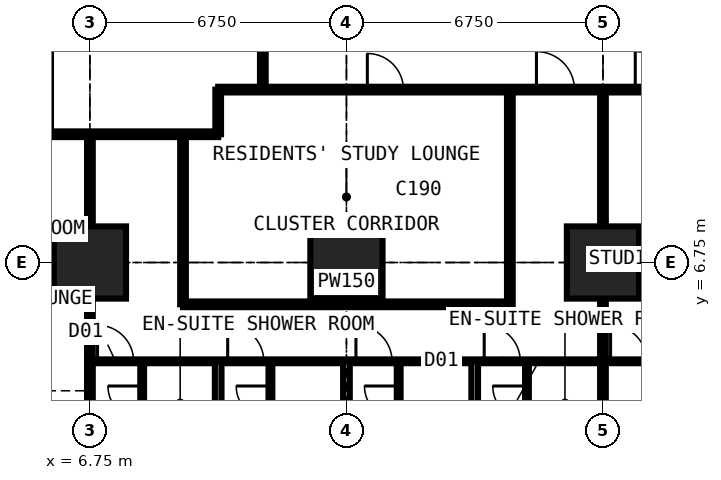
"""IFC4 building model, lengths in metres.
Left out: names, types, materials, properties, quantities, classifications, styles, units other than length and angle.
Written with IfcOpenShell. Run it as: python <this file> out.ifc"""

import sys

from ifc_helpers import new_model, si_unit, direction, frame, frame_2d, origin, origin_2d, place, context, subcontext, project, spatial, rectangle, extrude, element, fill, save


model = new_model("IFC4")
c1 = context("Model", 3, precision=1e-05, world=origin(), true_north=direction((0.0, 1.0)))
c2 = subcontext(c1, "Body", "Model", "MODEL_VIEW")
j1 = project(units=[si_unit("LENGTHUNIT", "METRE"), si_unit("PLANEANGLEUNIT", "RADIAN")], contexts=[c1])
p1 = place(None, origin())
s1 = spatial("IfcSite", under=j1, at=p1, CompositionType="ELEMENT")
p2 = place(p1, origin())
s2 = spatial("IfcBuilding", under=s1, at=p2, CompositionType="ELEMENT")
p3 = place(p2, frame((0.0, 0.0, 21.6)))
s3 = spatial("IfcBuildingStorey", under=s2, at=p3, CompositionType="ELEMENT", Elevation=21.6)
for number, where, z_axis, x_axis in (
    (1, (6.75, 6.75, 0.0), (0.0, 0.0, 1.0), (1.0, 0.0, 0.0)),
    (2, (13.5, 6.75, 0.0), (0.0, 0.0, 1.0), (1.0, 0.0, 0.0)),
    (3, (20.25, 6.75, 0.0), (0.0, 0.0, 1.0), (1.0, 0.0, 0.0)),
):
    element("IfcColumn", number, at=place(p3, frame(where, z_axis=z_axis, x_axis=x_axis)), inside=s3, PredefinedType="COLUMN", context=c2, shape_type="SweptSolid", body=[
        extrude(rectangle(XDim=1.9, YDim=1.9, at=origin_2d()), origin(), (0.0, 0.0, 1.0), 3.6),
    ])
p4 = place(p3, frame((-0.734, 10.125, 0.0), z_axis=(0.0, 0.0, 1.0), x_axis=(1.0, 0.0, 0.0)))
e4 = element("IfcWall", 4, at=p4, inside=s3, PredefinedType="PARTITIONING", context=c2, shape_type="SweptSolid", body=[
    extrude(rectangle(XDim=10.859, YDim=0.15, at=frame_2d((5.429, 0.0))), origin(), (0.0, 0.0, 1.0), 3.375),
])
p5 = place(p4, frame((5.134, 0.0, 0.0)))
e5 = element("IfcOpeningElement", 5, at=p5, cuts=e4, PredefinedType="OPENING", context=c2, shape_type="SweptSolid", body=[
    extrude(rectangle(XDim=1.0, YDim=2.2, at=frame_2d((0.5, 1.1))), frame((0.0, 0.085, 0.0), z_axis=(0.0, -1.0, 0.0), x_axis=(1.0, 0.0, 0.0)), (0.0, 0.0, 1.0), 0.17),
])
p6 = place(p3, frame((6.75, -0.734, 0.0), z_axis=(0.0, 0.0, 1.0), x_axis=(0.0, 1.0, 0.0)))
e6 = element("IfcWall", 6, at=p6, inside=s3, PredefinedType="PARTITIONING", context=c2, shape_type="SweptSolid", body=[
    extrude(rectangle(XDim=10.859, YDim=0.15, at=frame_2d((5.429, 0.0))), origin(), (0.0, 0.0, 1.0), 2.877),
])
p7 = place(p3, frame((6.75, 4.15, 0.0), z_axis=(0.0, 0.0, 1.0), x_axis=(1.0, 0.0, 0.0)))
e7 = element("IfcWall", 7, at=p7, inside=s3, PredefinedType="PARTITIONING", context=c2, shape_type="SweptSolid", body=[
    extrude(rectangle(XDim=23.625, YDim=0.1, at=frame_2d((11.812, 0.0))), origin(), (0.0, 0.0, 1.0), 3.375),
])
p8 = place(p7, frame((0.2, 0.0, 0.0)))
e8 = element("IfcOpeningElement", 8, at=p8, cuts=e7, PredefinedType="OPENING", context=c2, shape_type="SweptSolid", body=[
    extrude(rectangle(XDim=0.95, YDim=2.2, at=frame_2d((0.475, 1.1))), frame((0.0, 0.06, 0.0), z_axis=(0.0, -1.0, 0.0), x_axis=(1.0, 0.0, 0.0)), (0.0, 0.0, 1.0), 0.12),
])
p9 = place(p7, frame((3.625, 0.0, 0.0)))
e9 = element("IfcOpeningElement", 9, at=p9, cuts=e7, PredefinedType="OPENING", context=c2, shape_type="SweptSolid", body=[
    extrude(rectangle(XDim=0.95, YDim=2.2, at=frame_2d((0.475, 1.1))), frame((0.0, 0.06, 0.0), z_axis=(0.0, -1.0, 0.0), x_axis=(1.0, 0.0, 0.0)), (0.0, 0.0, 1.0), 0.12),
])
p10 = place(p7, frame((7.0, 0.0, 0.0)))
e10 = element("IfcOpeningElement", 10, at=p10, cuts=e7, PredefinedType="OPENING", context=c2, shape_type="SweptSolid", body=[
    extrude(rectangle(XDim=0.95, YDim=2.2, at=frame_2d((0.475, 1.1))), frame((0.0, 0.06, 0.0), z_axis=(0.0, -1.0, 0.0), x_axis=(1.0, 0.0, 0.0)), (0.0, 0.0, 1.0), 0.12),
])
p11 = place(p7, frame((10.375, 0.0, 0.0)))
e11 = element("IfcOpeningElement", 11, at=p11, cuts=e7, PredefinedType="OPENING", context=c2, shape_type="SweptSolid", body=[
    extrude(rectangle(XDim=0.95, YDim=2.2, at=frame_2d((0.475, 1.1))), frame((0.0, 0.06, 0.0), z_axis=(0.0, -1.0, 0.0), x_axis=(1.0, 0.0, 0.0)), (0.0, 0.0, 1.0), 0.12),
])
p12 = place(p7, frame((18.475, 0.0, 0.0)))
e12 = element("IfcOpeningElement", 12, at=p12, cuts=e7, PredefinedType="OPENING", context=c2, shape_type="SweptSolid", body=[
    extrude(rectangle(XDim=0.95, YDim=2.2, at=frame_2d((0.475, 1.1))), frame((0.0, 0.06, 0.0), z_axis=(0.0, -1.0, 0.0), x_axis=(1.0, 0.0, 0.0)), (0.0, 0.0, 1.0), 0.12),
])
p13 = place(p7, frame((13.7, 0.0, 0.0)))
e13 = element("IfcOpeningElement", 13, at=p13, cuts=e7, PredefinedType="OPENING", context=c2, shape_type="SweptSolid", body=[
    extrude(rectangle(XDim=0.95, YDim=2.2, at=frame_2d((0.475, 1.1))), frame((0.0, 0.06, 0.0), z_axis=(0.0, -1.0, 0.0), x_axis=(1.0, 0.0, 0.0)), (0.0, 0.0, 1.0), 0.12),
])
p14 = place(p3, frame((8.125, 1.95, 0.0), z_axis=(0.0, 0.0, 1.0), x_axis=(0.0, 1.0, 0.0)))
e14 = element("IfcWall", 14, at=p14, inside=s3, PredefinedType="PARTITIONING", context=c2, shape_type="SweptSolid", body=[
    extrude(rectangle(XDim=2.2, YDim=0.1, at=frame_2d((1.1, 0.0))), origin(), (0.0, 0.0, 1.0), 3.375),
])
p15 = place(p14, frame((0.65, 0.0, 0.0)))
e15 = element("IfcOpeningElement", 15, at=p15, cuts=e14, PredefinedType="OPENING", context=c2, shape_type="SweptSolid", body=[
    extrude(rectangle(XDim=0.9, YDim=2.2, at=frame_2d((0.45, 1.1))), frame((0.0, 0.06, 0.0), z_axis=(0.0, -1.0, 0.0), x_axis=(1.0, 0.0, 0.0)), (0.0, 0.0, 1.0), 0.12),
])
p16 = place(p3, frame((9.2, 5.65, 0.0), z_axis=(0.0, 0.0, 1.0), x_axis=(0.0, 1.0, 0.0)))
e16 = element("IfcWall", 16, at=p16, inside=s3, PredefinedType="PARTITIONING", context=c2, shape_type="SweptSolid", body=[
    extrude(rectangle(XDim=4.475, YDim=0.15, at=frame_2d((2.238, 0.0))), origin(), (0.0, 0.0, 1.0), 3.375),
])
p17 = place(p3, frame((9.2, 5.65, 0.0), z_axis=(0.0, 0.0, 1.0), x_axis=(1.0, 0.0, 0.0)))
e17 = element("IfcWall", 17, at=p17, inside=s3, PredefinedType="PARTITIONING", context=c2, shape_type="SweptSolid", body=[
    extrude(rectangle(XDim=8.6, YDim=0.15, at=frame_2d((4.3, 0.0))), origin(), (0.0, 0.0, 1.0), 3.375),
])
p18 = place(p3, frame((10.125, -0.734, 0.0), z_axis=(0.0, 0.0, 1.0), x_axis=(0.0, 1.0, 0.0)))
e18 = element("IfcWall", 18, at=p18, inside=s3, PredefinedType="PARTITIONING", context=c2, shape_type="SweptSolid", body=[
    extrude(rectangle(XDim=4.884, YDim=0.175, at=frame_2d((2.442, 0.0))), origin(), (0.0, 0.0, 1.0), 3.375),
])
p19 = place(p3, frame((10.125, 10.125, 0.0), z_axis=(0.0, 0.0, 1.0), x_axis=(0.0, 1.0, 0.0)))
e19 = element("IfcWall", 19, at=p19, inside=s3, PredefinedType="PARTITIONING", context=c2, shape_type="SweptSolid", body=[
    extrude(rectangle(XDim=1.175, YDim=0.15, at=frame_2d((0.587, 0.0))), origin(), (0.0, 0.0, 1.0), 3.375),
])
p20 = place(p3, frame((10.125, 11.3, 0.0), z_axis=(0.0, 0.0, 1.0), x_axis=(1.0, 0.0, 0.0)))
e20 = element("IfcWall", 20, at=p20, inside=s3, PredefinedType="PARTITIONING", context=c2, shape_type="SweptSolid", body=[
    extrude(rectangle(XDim=20.675, YDim=0.15, at=frame_2d((10.337, 0.0))), origin(), (0.0, 0.0, 1.0), 3.375),
])
p21 = place(p20, frame((8.375, 0.0, 0.0)))
e21 = element("IfcOpeningElement", 21, at=p21, cuts=e20, PredefinedType="OPENING", context=c2, shape_type="SweptSolid", body=[
    extrude(rectangle(XDim=1.0, YDim=2.2, at=frame_2d((0.5, 1.1))), frame((0.0, 0.085, 0.0), z_axis=(0.0, -1.0, 0.0), x_axis=(1.0, 0.0, 0.0)), (0.0, 0.0, 1.0), 0.17),
])
p22 = place(p20, frame((10.975, 0.0, 0.0)))
e22 = element("IfcOpeningElement", 22, at=p22, cuts=e20, PredefinedType="OPENING", context=c2, shape_type="SweptSolid", body=[
    extrude(rectangle(XDim=1.0, YDim=2.2, at=frame_2d((0.5, 1.1))), frame((0.0, 0.085, 0.0), z_axis=(0.0, -1.0, 0.0), x_axis=(1.0, 0.0, 0.0)), (0.0, 0.0, 1.0), 0.17),
])
p23 = place(p20, frame((3.925, 0.0, 0.0)))
e23 = element("IfcOpeningElement", 23, at=p23, cuts=e20, PredefinedType="OPENING", context=c2, shape_type="SweptSolid", body=[
    extrude(rectangle(XDim=0.95, YDim=2.2, at=frame_2d((0.475, 1.1))), frame((0.0, 0.085, 0.0), z_axis=(0.0, -1.0, 0.0), x_axis=(1.0, 0.0, 0.0)), (0.0, 0.0, 1.0), 0.17),
])
p24 = place(p3, frame((11.3, 11.3, 0.0), z_axis=(0.0, 0.0, 1.0), x_axis=(0.0, 1.0, 0.0)))
e24 = element("IfcWall", 24, at=p24, inside=s3, PredefinedType="PARTITIONING", context=c2, shape_type="SweptSolid", body=[
    extrude(rectangle(XDim=19.075, YDim=0.15, at=frame_2d((9.538, 0.0))), origin(), (0.0, 0.0, 1.0), 3.375),
])
p25 = place(p24, frame((12.875, 0.0, 0.0)))
e25 = element("IfcOpeningElement", 25, at=p25, cuts=e24, PredefinedType="OPENING", context=c2, shape_type="SweptSolid", body=[
    extrude(rectangle(XDim=1.0, YDim=2.2, at=frame_2d((0.5, 1.1))), frame((0.0, 0.085, 0.0), z_axis=(0.0, -1.0, 0.0), x_axis=(1.0, 0.0, 0.0)), (0.0, 0.0, 1.0), 0.17),
])
p26 = place(p24, frame((10.438, 0.0, 0.0)))
e26 = element("IfcOpeningElement", 26, at=p26, cuts=e24, PredefinedType="OPENING", context=c2, shape_type="SweptSolid", body=[
    extrude(rectangle(XDim=1.0, YDim=2.2, at=frame_2d((0.5, 1.1))), frame((0.0, 0.085, 0.0), z_axis=(0.0, -1.0, 0.0), x_axis=(1.0, 0.0, 0.0)), (0.0, 0.0, 1.0), 0.17),
])
p27 = place(p24, frame((15.675, 0.0, 0.0)))
e27 = element("IfcOpeningElement", 27, at=p27, cuts=e24, PredefinedType="OPENING", context=c2, shape_type="SweptSolid", body=[
    extrude(rectangle(XDim=0.95, YDim=2.2, at=frame_2d((0.475, 1.1))), frame((0.0, 0.085, 0.0), z_axis=(0.0, -1.0, 0.0), x_axis=(1.0, 0.0, 0.0)), (0.0, 0.0, 1.0), 0.17),
])
p28 = place(p3, frame((11.5, 1.95, 0.0), z_axis=(0.0, 0.0, 1.0), x_axis=(0.0, 1.0, 0.0)))
e28 = element("IfcWall", 28, at=p28, inside=s3, PredefinedType="PARTITIONING", context=c2, shape_type="SweptSolid", body=[
    extrude(rectangle(XDim=2.2, YDim=0.1, at=frame_2d((1.1, 0.0))), origin(), (0.0, 0.0, 1.0), 3.375),
])
p29 = place(p28, frame((0.65, 0.0, 0.0)))
e29 = element("IfcOpeningElement", 29, at=p29, cuts=e28, PredefinedType="OPENING", context=c2, shape_type="SweptSolid", body=[
    extrude(rectangle(XDim=0.9, YDim=2.2, at=frame_2d((0.45, 1.1))), frame((0.0, 0.06, 0.0), z_axis=(0.0, -1.0, 0.0), x_axis=(1.0, 0.0, 0.0)), (0.0, 0.0, 1.0), 0.12),
])
p30 = place(p3, frame((13.5, -0.734, 0.0), z_axis=(0.0, 0.0, 1.0), x_axis=(0.0, 1.0, 0.0)))
e30 = element("IfcWall", 30, at=p30, inside=s3, PredefinedType="PARTITIONING", context=c2, shape_type="SweptSolid", body=[
    extrude(rectangle(XDim=4.884, YDim=0.175, at=frame_2d((2.442, 0.0))), origin(), (0.0, 0.0, 1.0), 2.61),
])
p31 = place(p3, frame((14.875, 1.95, 0.0), z_axis=(0.0, 0.0, 1.0), x_axis=(0.0, 1.0, 0.0)))
e31 = element("IfcWall", 31, at=p31, inside=s3, PredefinedType="PARTITIONING", context=c2, shape_type="SweptSolid", body=[
    extrude(rectangle(XDim=2.2, YDim=0.1, at=frame_2d((1.1, 0.0))), origin(), (0.0, 0.0, 1.0), 3.375),
])
p32 = place(p31, frame((0.65, 0.0, 0.0)))
e32 = element("IfcOpeningElement", 32, at=p32, cuts=e31, PredefinedType="OPENING", context=c2, shape_type="SweptSolid", body=[
    extrude(rectangle(XDim=0.9, YDim=2.2, at=frame_2d((0.45, 1.1))), frame((0.0, 0.06, 0.0), z_axis=(0.0, -1.0, 0.0), x_axis=(1.0, 0.0, 0.0)), (0.0, 0.0, 1.0), 0.12),
])
p33 = place(p3, frame((16.875, -0.734, 0.0), z_axis=(0.0, 0.0, 1.0), x_axis=(0.0, 1.0, 0.0)))
e33 = element("IfcWall", 33, at=p33, inside=s3, PredefinedType="PARTITIONING", context=c2, shape_type="SweptSolid", body=[
    extrude(rectangle(XDim=4.884, YDim=0.175, at=frame_2d((2.442, 0.0))), origin(), (0.0, 0.0, 1.0), 3.375),
])
p34 = place(p3, frame((17.8, 5.65, 0.0), z_axis=(0.0, 0.0, 1.0), x_axis=(0.0, 1.0, 0.0)))
e34 = element("IfcWall", 34, at=p34, inside=s3, PredefinedType="PARTITIONING", context=c2, shape_type="SweptSolid", body=[
    extrude(rectangle(XDim=5.65, YDim=0.15, at=frame_2d((2.825, 0.0))), origin(), (0.0, 0.0, 1.0), 3.375),
])
p35 = place(p3, frame((18.25, 1.95, 0.0), z_axis=(0.0, 0.0, 1.0), x_axis=(0.0, 1.0, 0.0)))
e35 = element("IfcWall", 35, at=p35, inside=s3, PredefinedType="PARTITIONING", context=c2, shape_type="SweptSolid", body=[
    extrude(rectangle(XDim=2.2, YDim=0.1, at=frame_2d((1.1, 0.0))), origin(), (0.0, 0.0, 1.0), 3.375),
])
p36 = place(p35, frame((0.65, 0.0, 0.0)))
e36 = element("IfcOpeningElement", 36, at=p36, cuts=e35, PredefinedType="OPENING", context=c2, shape_type="SweptSolid", body=[
    extrude(rectangle(XDim=0.9, YDim=2.2, at=frame_2d((0.45, 1.1))), frame((0.0, 0.06, 0.0), z_axis=(0.0, -1.0, 0.0), x_axis=(1.0, 0.0, 0.0)), (0.0, 0.0, 1.0), 0.12),
])
p37 = place(p3, frame((20.25, -0.734, 0.0), z_axis=(0.0, 0.0, 1.0), x_axis=(0.0, 1.0, 0.0)))
e37 = element("IfcWall", 37, at=p37, inside=s3, PredefinedType="PARTITIONING", context=c2, shape_type="SweptSolid", body=[
    extrude(rectangle(XDim=12.034, YDim=0.15, at=frame_2d((6.017, 0.0))), origin(), (0.0, 0.0, 1.0), 2.61),
])
p38 = place(p8, origin())
e38 = element("IfcDoor", 38, at=p38, inside=s3, OperationType="SINGLE_SWING_LEFT", PredefinedType="DOOR", context=c2, shape_type="SweptSolid", body=[
    extrude(rectangle(XDim=0.95, YDim=2.2, at=frame_2d((0.475, 1.1))), frame((0.0, 0.025, 0.0), z_axis=(0.0, -1.0, 0.0), x_axis=(1.0, 0.0, 0.0)), (0.0, 0.0, 1.0), 0.05),
])
fill(e8, e38)
p39 = place(p15, origin())
e39 = element("IfcDoor", 39, at=p39, inside=s3, OperationType="SINGLE_SWING_RIGHT", PredefinedType="DOOR", context=c2, shape_type="SweptSolid", body=[
    extrude(rectangle(XDim=0.9, YDim=2.2, at=frame_2d((0.45, 1.1))), frame((0.0, 0.025, 0.0), z_axis=(0.0, -1.0, 0.0), x_axis=(1.0, 0.0, 0.0)), (0.0, 0.0, 1.0), 0.05),
])
fill(e15, e39)
p40 = place(p9, origin())
e40 = element("IfcDoor", 40, at=p40, inside=s3, OperationType="SINGLE_SWING_LEFT", PredefinedType="DOOR", context=c2, shape_type="SweptSolid", body=[
    extrude(rectangle(XDim=0.95, YDim=2.2, at=frame_2d((0.475, 1.1))), frame((0.0, 0.025, 0.0), z_axis=(0.0, -1.0, 0.0), x_axis=(1.0, 0.0, 0.0)), (0.0, 0.0, 1.0), 0.05),
])
fill(e9, e40)
p41 = place(p29, origin())
e41 = element("IfcDoor", 41, at=p41, inside=s3, OperationType="SINGLE_SWING_RIGHT", PredefinedType="DOOR", context=c2, shape_type="SweptSolid", body=[
    extrude(rectangle(XDim=0.9, YDim=2.2, at=frame_2d((0.45, 1.1))), frame((0.0, 0.025, 0.0), z_axis=(0.0, -1.0, 0.0), x_axis=(1.0, 0.0, 0.0)), (0.0, 0.0, 1.0), 0.05),
])
fill(e29, e41)
p42 = place(p10, origin())
e42 = element("IfcDoor", 42, at=p42, inside=s3, OperationType="SINGLE_SWING_LEFT", PredefinedType="DOOR", context=c2, shape_type="SweptSolid", body=[
    extrude(rectangle(XDim=0.95, YDim=2.2, at=frame_2d((0.475, 1.1))), frame((0.0, 0.025, 0.0), z_axis=(0.0, -1.0, 0.0), x_axis=(1.0, 0.0, 0.0)), (0.0, 0.0, 1.0), 0.05),
])
fill(e10, e42)
p43 = place(p32, origin())
e43 = element("IfcDoor", 43, at=p43, inside=s3, OperationType="SINGLE_SWING_RIGHT", PredefinedType="DOOR", context=c2, shape_type="SweptSolid", body=[
    extrude(rectangle(XDim=0.9, YDim=2.2, at=frame_2d((0.45, 1.1))), frame((0.0, 0.025, 0.0), z_axis=(0.0, -1.0, 0.0), x_axis=(1.0, 0.0, 0.0)), (0.0, 0.0, 1.0), 0.05),
])
fill(e32, e43)
p44 = place(p11, origin())
e44 = element("IfcDoor", 44, at=p44, inside=s3, OperationType="SINGLE_SWING_LEFT", PredefinedType="DOOR", context=c2, shape_type="SweptSolid", body=[
    extrude(rectangle(XDim=0.95, YDim=2.2, at=frame_2d((0.475, 1.1))), frame((0.0, 0.025, 0.0), z_axis=(0.0, -1.0, 0.0), x_axis=(1.0, 0.0, 0.0)), (0.0, 0.0, 1.0), 0.05),
])
fill(e11, e44)
p45 = place(p36, origin())
e45 = element("IfcDoor", 45, at=p45, inside=s3, OperationType="SINGLE_SWING_RIGHT", PredefinedType="DOOR", context=c2, shape_type="SweptSolid", body=[
    extrude(rectangle(XDim=0.9, YDim=2.2, at=frame_2d((0.45, 1.1))), frame((0.0, 0.025, 0.0), z_axis=(0.0, -1.0, 0.0), x_axis=(1.0, 0.0, 0.0)), (0.0, 0.0, 1.0), 0.05),
])
fill(e36, e45)
p46 = place(p21, origin())
e46 = element("IfcDoor", 46, at=p46, inside=s3, OperationType="SINGLE_SWING_LEFT", PredefinedType="DOOR", context=c2, shape_type="SweptSolid", body=[
    extrude(rectangle(XDim=1.0, YDim=2.2, at=frame_2d((0.5, 1.1))), frame((0.0, 0.025, 0.0), z_axis=(0.0, -1.0, 0.0), x_axis=(1.0, 0.0, 0.0)), (0.0, 0.0, 1.0), 0.05),
])
fill(e21, e46)
p47 = place(p13, origin())
e47 = element("IfcDoor", 47, at=p47, inside=s3, OperationType="SINGLE_SWING_LEFT", PredefinedType="DOOR", context=c2, shape_type="SweptSolid", body=[
    extrude(rectangle(XDim=0.95, YDim=2.2, at=frame_2d((0.475, 1.1))), frame((0.0, 0.025, 0.0), z_axis=(0.0, -1.0, 0.0), x_axis=(1.0, 0.0, 0.0)), (0.0, 0.0, 1.0), 0.05),
])
fill(e13, e47)
p48 = place(p22, origin())
e48 = element("IfcDoor", 48, at=p48, inside=s3, OperationType="SINGLE_SWING_LEFT", PredefinedType="DOOR", context=c2, shape_type="SweptSolid", body=[
    extrude(rectangle(XDim=1.0, YDim=2.2, at=frame_2d((0.5, 1.1))), frame((0.0, 0.025, 0.0), z_axis=(0.0, -1.0, 0.0), x_axis=(1.0, 0.0, 0.0)), (0.0, 0.0, 1.0), 0.05),
])
fill(e22, e48)
p49 = place(p23, origin())
e49 = element("IfcDoor", 49, at=p49, inside=s3, OperationType="SINGLE_SWING_LEFT", PredefinedType="DOOR", context=c2, shape_type="SweptSolid", body=[
    extrude(rectangle(XDim=0.95, YDim=2.2, at=frame_2d((0.475, 1.1))), frame((0.0, 0.025, 0.0), z_axis=(0.0, -1.0, 0.0), x_axis=(1.0, 0.0, 0.0)), (0.0, 0.0, 1.0), 0.05),
])
fill(e23, e49)
save(model, sys.argv[1])
